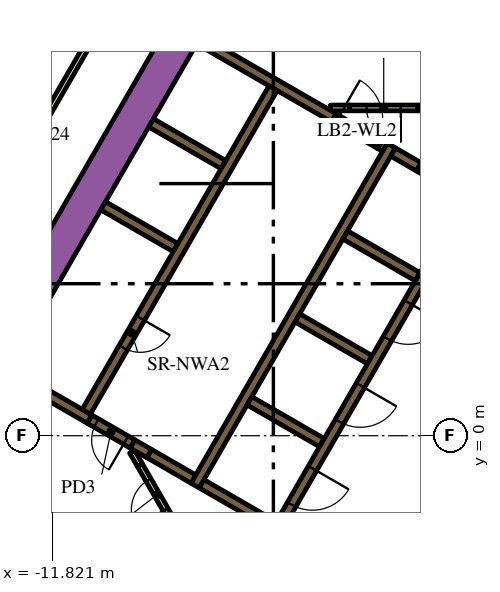
"""IFC4 building model, lengths in metres.
Left out: names, types, materials, properties, quantities, classifications, styles, units other than length and angle.
Written with IfcOpenShell. Run it as: python <this file> out.ifc"""

import sys

from ifc_helpers import new_model, si_unit, direction, frame, frame_2d, origin, place, context, subcontext, project, spatial, polyline, rectangle, outline, extrude, element, fill, save


model = new_model("IFC4")
c1 = context("Model", 3, precision=1e-05, world=origin(), true_north=direction((0.0, 1.0)))
c2 = subcontext(c1, "Body", "Model", "MODEL_VIEW")
j1 = project(units=[si_unit("LENGTHUNIT", "METRE"), si_unit("PLANEANGLEUNIT", "RADIAN")], contexts=[c1])
p1 = place(None, origin())
s1 = spatial("IfcSite", under=j1, at=p1, CompositionType="ELEMENT")
p2 = place(p1, origin())
s2 = spatial("IfcBuilding", under=s1, at=p2, CompositionType="ELEMENT")
p3 = place(p2, frame((0.0, 0.0, 130.5)))
s3 = spatial("IfcBuildingStorey", under=s2, at=p3, CompositionType="ELEMENT", Elevation=130.5)
p4 = place(p3, frame((-14.268, 0.387, 0.0), z_axis=(0.0, 0.0, 1.0), x_axis=(0.499994617707, 0.866028511231, 0.0)))
e1 = element("IfcWall", 1, at=p4, inside=s3, PredefinedType="SOLIDWALL", context=c2, shape_type="SweptSolid", body=[
    extrude(rectangle(XDim=18.817, YDim=0.9, at=frame_2d((9.409, 0.0))), origin(), (0.0, 0.0, 1.0), 3.9),
])
p5 = place(p3, frame((-8.06, -1.311, 0.0), z_axis=(0.0, 0.0, 1.0), x_axis=(0.50000273126, 0.866023826885, 0.0)))
e2 = element("IfcWall", 2, at=p5, inside=s3, PredefinedType="SOLIDWALL", context=c2, shape_type="SweptSolid", body=[
    extrude(rectangle(XDim=10.33, YDim=0.25, at=frame_2d((5.165, 0.0))), origin(), (0.0, 0.0, 1.0), 3.9),
])
p6 = place(p3, frame((-1.819, 6.87, 0.0), z_axis=(0.0, 0.0, 1.0), x_axis=(-0.866294599386, 0.499533449405, 0.0)))
e3 = element("IfcWall", 3, at=p6, inside=s3, PredefinedType="SOLIDWALL", context=c2, shape_type="SweptSolid", body=[
    extrude(rectangle(XDim=0.41, YDim=0.25, at=frame_2d((0.205, 0.0))), origin(), (0.0, 0.0, 1.0), 3.9),
])
p7 = place(p3, frame((-2.849, 7.465, 0.0), z_axis=(0.0, 0.0, 1.0), x_axis=(0.865955664968, -0.500120771724, 0.0)))
e4 = element("IfcWall", 4, at=p7, inside=s3, PredefinedType="SOLIDWALL", context=c2, shape_type="SweptSolid", body=[
    extrude(rectangle(XDim=0.778, YDim=0.25, at=frame_2d((0.389, 0.0))), origin(), (0.0, 0.0, 1.0), 3.9),
])
for number, where, z_axis, x_axis in (
    (5, (-2.204, 4.182, 0.0), (0.0, 0.0, 1.0), (-0.866, 0.5, 0.0)),
    (6, (-5.369, 3.1, 0.0), (0.0, 0.0, 1.0), (0.866, -0.5, 0.0)),
    (7, (-4.724, -0.182, 0.0), (0.0, 0.0, 1.0), (-0.866, 0.5, 0.0)),
):
    element("IfcWall", number, at=place(p3, frame(where, z_axis=z_axis, x_axis=x_axis)), inside=s3, PredefinedType="SOLIDWALL", context=c2, shape_type="SweptSolid", body=[
        extrude(rectangle(XDim=2.2, YDim=0.25, at=frame_2d((1.1, 0.0))), origin(), (0.0, 0.0, 1.0), 3.9),
    ])
p8 = place(p3, origin())
e8 = element("IfcWall", 8, at=p8, inside=s3, PredefinedType="SOLIDWALL", context=c2, shape_type="SweptSolid", body=[
    extrude(outline(polyline([(-5.922, -2.257), (-5.922, -2.257), (-5.705, -2.382), (-5.83, -2.598), (-6.418, -2.258), (-6.433, -2.153), (-6.433, -2.153), (-6.433, -2.153), (-6.508, -2.163), (-6.508, -2.163), (-6.508, -2.163), (-6.501, -2.21), (-7.952, -1.373), (-7.827, -1.156), (-5.922, -2.257)])), origin(), (0.0, 0.0, 1.0), 3.9),
])
p9 = place(p3, frame((-9.708, -0.215, 0.0), z_axis=(0.0, 0.0, 1.0), x_axis=(0.866113839764, -0.499846793097, 0.0)))
e9 = element("IfcWall", 9, at=p9, inside=s3, PredefinedType="SOLIDWALL", context=c2, shape_type="SweptSolid", body=[
    extrude(rectangle(XDim=0.51, YDim=0.25, at=frame_2d((0.255, 0.0))), origin(), (0.0, 0.0, 1.0), 3.9),
])
p10 = place(p3, frame((-12.999, 1.685, 0.0), z_axis=(0.0, 0.0, 1.0), x_axis=(0.865996765544, -0.500049599607, 0.0)))
e10 = element("IfcWall", 10, at=p10, inside=s3, PredefinedType="SOLIDWALL", context=c2, shape_type="SweptSolid", body=[
    extrude(rectangle(XDim=2.498, YDim=0.25, at=frame_2d((1.249, 0.0))), origin(), (0.0, 0.0, 1.0), 3.9),
])
p11 = place(p3, frame((-9.265, -0.471, 0.0), z_axis=(0.0, 0.0, 1.0), x_axis=(0.865954634268, -0.500122556369, 0.0)))
e11 = element("IfcWall", 11, at=p11, inside=s3, PredefinedType="SOLIDWALL", context=c2, shape_type="SweptSolid", body=[
    extrude(rectangle(XDim=1.338, YDim=0.25, at=frame_2d((0.669, 0.0))), origin(), (0.0, 0.0, 1.0), 3.9),
])
e12 = element("IfcWall", 12, at=p8, inside=s3, PredefinedType="SOLIDWALL", context=c2, shape_type="SweptSolid", body=[
    extrude(outline(polyline([(-3.128, 7.481), (-3.259, 7.557), (-3.134, 7.773), (-3.003, 7.698), (-3.128, 7.481)])), origin(), (0.0, 0.0, 1.0), 3.9),
])
for number, where, z_axis, x_axis in (
    (13, (-8.574, 4.95, 0.0), (0.0, 0.0, 1.0), (-0.866, 0.5, 0.0)),
    (14, (-7.314, 7.132, 0.0), (0.0, 0.0, 1.0), (-0.866, 0.5, 0.0)),
):
    element("IfcWall", number, at=place(p3, frame(where, z_axis=z_axis, x_axis=x_axis)), inside=s3, PredefinedType="SOLIDWALL", context=c2, shape_type="SweptSolid", body=[
        extrude(rectangle(XDim=2.2, YDim=0.25, at=frame_2d((1.1, 0.0))), origin(), (0.0, 0.0, 1.0), 3.9),
    ])
p12 = place(p3, frame((-7.959, 10.415, 0.0), z_axis=(0.0, 0.0, 1.0), x_axis=(0.866020958405, -0.500007699544, 0.0)))
e15 = element("IfcWall", 15, at=p12, inside=s3, PredefinedType="SOLIDWALL", context=c2, shape_type="SweptSolid", body=[
    extrude(rectangle(XDim=4.1, YDim=0.25, at=frame_2d((2.05, 0.0))), origin(), (0.0, 0.0, 1.0), 3.9),
])
p13 = place(p3, frame((-6.531, -2.689, 0.0), z_axis=(0.0, 0.0, 1.0), x_axis=(-0.499967446111, 0.866044197965, 0.0)))
e16 = element("IfcWall", 16, at=p13, inside=s3, PredefinedType="PARTITIONING", context=c2, shape_type="SweptSolid", body=[
    extrude(rectangle(XDim=0.748, YDim=0.15, at=frame_2d((0.374, 0.0))), origin(), (0.0, 0.0, 1.0), 2.6),
])
p14 = place(p3, frame((-9.512, -0.775, 0.0), z_axis=(0.0, 0.0, 1.0), x_axis=(-0.500080620599, 0.865978852456, 0.0)))
e17 = element("IfcWall", 17, at=p14, inside=s3, PredefinedType="PARTITIONING", context=c2, shape_type="SweptSolid", body=[
    extrude(rectangle(XDim=0.413, YDim=0.15, at=frame_2d((0.207, 0.0))), origin(), (0.0, 0.0, 1.0), 2.6),
])
p15 = place(p3, frame((-3.997, 8.625, 0.0), z_axis=(0.0, 0.0, 1.0), x_axis=(-1.0, 0.0, 0.0)))
e18 = element("IfcWall", 18, at=p15, inside=s3, PredefinedType="PARTITIONING", context=c2, shape_type="SweptSolid", body=[
    extrude(rectangle(XDim=0.502, YDim=0.15, at=frame_2d((0.251, 0.0))), origin(), (0.0, 0.0, 1.0), 2.6),
])
p16 = place(p3, frame((-2.196, 8.625, 0.0), z_axis=(0.0, 0.0, 1.0), x_axis=(1.0, 0.0, 0.0)))
e19 = element("IfcWall", 19, at=p16, inside=s3, PredefinedType="PARTITIONING", context=c2, shape_type="SweptSolid", body=[
    extrude(rectangle(XDim=1.146, YDim=0.15, at=frame_2d((0.573, 0.0))), origin(), (0.0, 0.0, 1.0), 2.6),
])
p17 = place(p3, frame((-6.008, 9.144, 0.0), z_axis=(0.0, 0.0, 1.0), x_axis=(-0.500006956611, -0.866021387346, 0.0)))
e20 = element("IfcWall", 20, at=p17, inside=s3, PredefinedType="SOLIDWALL", context=c2, shape_type="SweptSolid", body=[
    extrude(rectangle(XDim=9.83, YDim=0.25, at=frame_2d((4.915, 0.0))), origin(), (0.0, 0.0, 1.0), 3.9),
])
p18 = place(p17, frame((6.985, 0.0, 0.0)))
e21 = element("IfcOpeningElement", 21, at=p18, cuts=e20, PredefinedType="OPENING", context=c2, shape_type="SweptSolid", body=[
    extrude(rectangle(XDim=0.9, YDim=2.1, at=frame_2d((0.45, 1.05))), frame((0.0, 0.135, 0.0), z_axis=(0.0, -1.0, 0.0), x_axis=(1.0, 0.0, 0.0)), (0.0, 0.0, 1.0), 0.27),
])
p19 = place(p3, frame((-0.898, 6.194, 0.0), z_axis=(0.0, 0.0, 1.0), x_axis=(-0.499996202215, -0.866027596426, 0.0)))
e22 = element("IfcWall", 22, at=p19, inside=s3, PredefinedType="SOLIDWALL", context=c2, shape_type="SweptSolid", body=[
    extrude(rectangle(XDim=9.83, YDim=0.25, at=frame_2d((4.915, 0.0))), origin(), (0.0, 0.0, 1.0), 3.9),
])
p20 = place(p19, frame((0.585, 0.0, 0.0)))
e23 = element("IfcOpeningElement", 23, at=p20, cuts=e22, PredefinedType="OPENING", context=c2, shape_type="SweptSolid", body=[
    extrude(rectangle(XDim=1.1, YDim=2.1, at=frame_2d((0.55, 1.05))), frame((0.0, 0.135, 0.0), z_axis=(0.0, -1.0, 0.0), x_axis=(1.0, 0.0, 0.0)), (0.0, 0.0, 1.0), 0.27),
])
p21 = place(p19, frame((3.105, 0.0, 0.0)))
e24 = element("IfcOpeningElement", 24, at=p21, cuts=e22, PredefinedType="OPENING", context=c2, shape_type="SweptSolid", body=[
    extrude(rectangle(XDim=1.1, YDim=2.1, at=frame_2d((0.55, 1.05))), frame((0.0, 0.135, 0.0), z_axis=(0.0, -1.0, 0.0), x_axis=(1.0, 0.0, 0.0)), (0.0, 0.0, 1.0), 0.27),
])
p22 = place(p19, frame((5.625, 0.0, 0.0)))
e25 = element("IfcOpeningElement", 25, at=p22, cuts=e22, PredefinedType="OPENING", context=c2, shape_type="SweptSolid", body=[
    extrude(rectangle(XDim=1.1, YDim=2.1, at=frame_2d((0.55, 1.05))), frame((0.0, 0.135, 0.0), z_axis=(0.0, -1.0, 0.0), x_axis=(1.0, 0.0, 0.0)), (0.0, 0.0, 1.0), 0.27),
])
p23 = place(p19, frame((8.145, 0.0, 0.0)))
e26 = element("IfcOpeningElement", 26, at=p23, cuts=e22, PredefinedType="OPENING", context=c2, shape_type="SweptSolid", body=[
    extrude(rectangle(XDim=1.1, YDim=2.1, at=frame_2d((0.55, 1.05))), frame((0.0, 0.135, 0.0), z_axis=(0.0, -1.0, 0.0), x_axis=(1.0, 0.0, 0.0)), (0.0, 0.0, 1.0), 0.27),
])
p24 = place(p3, frame((-2.196, 8.625, 0.0), z_axis=(0.0, 0.0, 1.0), x_axis=(-1.0, 0.0, 0.0)))
e27 = element("IfcWall", 27, at=p24, inside=s3, PredefinedType="PARTITIONING", context=c2, shape_type="SweptSolid", body=[
    extrude(rectangle(XDim=1.8, YDim=0.15, at=frame_2d((0.9, 0.0))), origin(), (0.0, 0.0, 1.0), 2.6),
])
p25 = place(p24, frame((0.45, 0.0, 0.0)))
e28 = element("IfcOpeningElement", 28, at=p25, cuts=e27, PredefinedType="OPENING", context=c2, shape_type="SweptSolid", body=[
    extrude(rectangle(XDim=0.9, YDim=2.1, at=frame_2d((0.45, 1.05))), frame((0.0, 0.085, 0.0), z_axis=(0.0, -1.0, 0.0), x_axis=(1.0, 0.0, 0.0)), (0.0, 0.0, 1.0), 0.17),
])
p26 = place(p3, frame((-9.708, -0.215, 0.0), z_axis=(0.0, 0.0, 1.0), x_axis=(-0.866004217611, 0.500036693733, 0.0)))
e29 = element("IfcWall", 29, at=p26, inside=s3, PredefinedType="SOLIDWALL", context=c2, shape_type="SweptSolid", body=[
    extrude(rectangle(XDim=1.3, YDim=0.25, at=frame_2d((0.65, 0.0))), origin(), (0.0, 0.0, 1.0), 3.9),
])
p27 = place(p26, frame((0.2, 0.0, 0.0)))
e30 = element("IfcOpeningElement", 30, at=p27, cuts=e29, PredefinedType="OPENING", context=c2, shape_type="SweptSolid", body=[
    extrude(rectangle(XDim=0.9, YDim=2.1, at=frame_2d((0.45, 1.05))), frame((0.0, 0.135, 0.0), z_axis=(0.0, -1.0, 0.0), x_axis=(1.0, 0.0, 0.0)), (0.0, 0.0, 1.0), 0.27),
])
p28 = place(p3, frame((-4.409, 8.365, 0.0), z_axis=(0.0, 0.0, 1.0), x_axis=(0.866034573852, -0.49998411664, 0.0)))
e31 = element("IfcWall", 31, at=p28, inside=s3, PredefinedType="SOLIDWALL", context=c2, shape_type="SweptSolid", body=[
    extrude(rectangle(XDim=1.4, YDim=0.25, at=frame_2d((0.7, 0.0))), origin(), (0.0, 0.0, 1.0), 3.9),
])
p29 = place(p28, frame((0.1, 0.0, 0.0)))
e32 = element("IfcOpeningElement", 32, at=p29, cuts=e31, PredefinedType="OPENING", context=c2, shape_type="SweptSolid", body=[
    extrude(rectangle(XDim=1.2, YDim=2.1, at=frame_2d((0.6, 1.05))), frame((0.0, 0.135, 0.0), z_axis=(0.0, -1.0, 0.0), x_axis=(1.0, 0.0, 0.0)), (0.0, 0.0, 1.0), 0.27),
])
p30 = place(p3, frame((-8.612, -2.333, 0.0), z_axis=(0.0, 0.0, 1.0), x_axis=(-0.499961193289, 0.866047807691, 0.0)))
e33 = element("IfcWall", 33, at=p30, inside=s3, PredefinedType="PARTITIONING", context=c2, shape_type="SweptSolid", body=[
    extrude(rectangle(XDim=1.8, YDim=0.15, at=frame_2d((0.9, 0.0))), origin(), (0.0, 0.0, 1.0), 2.6),
])
p31 = place(p30, frame((0.45, 0.0, 0.0)))
e34 = element("IfcOpeningElement", 34, at=p31, cuts=e33, PredefinedType="OPENING", context=c2, shape_type="SweptSolid", body=[
    extrude(rectangle(XDim=0.9, YDim=2.1, at=frame_2d((0.45, 1.05))), frame((0.0, 0.085, 0.0), z_axis=(0.0, -1.0, 0.0), x_axis=(1.0, 0.0, 0.0)), (0.0, 0.0, 1.0), 0.17),
])
p32 = place(p3, frame((-19.081, -3.9, 0.0), z_axis=(0.0, 0.0, 1.0), x_axis=(0.499998313975, 0.866026377209, 0.0)))
e35 = element("IfcWall", 35, at=p32, inside=s3, PredefinedType="PARTITIONING", context=c2, shape_type="SweptSolid", body=[
    extrude(rectangle(XDim=25.766, YDim=0.15, at=frame_2d((12.883, 0.0))), origin(), (0.0, 0.0, 1.0), 2.6),
])
p33 = place(p32, frame((24.141, 0.0, 0.0)))
e36 = element("IfcOpeningElement", 36, at=p33, cuts=e35, PredefinedType="OPENING", context=c2, shape_type="SweptSolid", body=[
    extrude(rectangle(XDim=1.1, YDim=2.1, at=frame_2d((0.55, 1.05))), frame((0.0, 0.085, 0.0), z_axis=(0.0, -1.0, 0.0), x_axis=(1.0, 0.0, 0.0)), (0.0, 0.0, 1.0), 0.17),
])
p34 = place(p32, frame((13.144, 0.0, 0.0)))
e37 = element("IfcOpeningElement", 37, at=p34, cuts=e35, PredefinedType="OPENING", context=c2, shape_type="SweptSolid", body=[
    extrude(rectangle(XDim=1.0, YDim=2.1, at=frame_2d((0.5, 1.05))), frame((0.0, 0.085, 0.0), z_axis=(0.0, -1.0, 0.0), x_axis=(1.0, 0.0, 0.0)), (0.0, 0.0, 1.0), 0.17),
])
p35 = place(p32, frame((11.593, 0.0, 0.0)))
e38 = element("IfcOpeningElement", 38, at=p35, cuts=e35, PredefinedType="OPENING", context=c2, shape_type="SweptSolid", body=[
    extrude(rectangle(XDim=1.1, YDim=2.1, at=frame_2d((0.55, 1.05))), frame((0.0, 0.085, 0.0), z_axis=(0.0, -1.0, 0.0), x_axis=(1.0, 0.0, 0.0)), (0.0, 0.0, 1.0), 0.17),
])
p36 = place(p32, frame((0.596, 0.0, 0.0)))
e39 = element("IfcOpeningElement", 39, at=p36, cuts=e35, PredefinedType="OPENING", context=c2, shape_type="SweptSolid", body=[
    extrude(rectangle(XDim=1.0, YDim=2.1, at=frame_2d((0.5, 1.05))), frame((0.0, 0.085, 0.0), z_axis=(0.0, -1.0, 0.0), x_axis=(1.0, 0.0, 0.0)), (0.0, 0.0, 1.0), 0.17),
])
p37 = place(p18, origin())
e40 = element("IfcDoor", 40, at=p37, inside=s3, OperationType="SINGLE_SWING_LEFT", PredefinedType="DOOR", context=c2, shape_type="SweptSolid", body=[
    extrude(rectangle(XDim=0.9, YDim=2.1, at=frame_2d((0.45, 1.05))), frame((0.0, 0.025, 0.0), z_axis=(0.0, -1.0, 0.0), x_axis=(1.0, 0.0, 0.0)), (0.0, 0.0, 1.0), 0.05),
])
fill(e21, e40)
p38 = place(p21, origin())
e41 = element("IfcDoor", 41, at=p38, inside=s3, OperationType="DOUBLE_DOOR_SLIDING", PredefinedType="DOOR", context=c2, shape_type="SweptSolid", body=[
    extrude(rectangle(XDim=1.1, YDim=2.1, at=frame_2d((0.55, 1.05))), frame((0.0, 0.025, 0.0), z_axis=(0.0, -1.0, 0.0), x_axis=(1.0, 0.0, 0.0)), (0.0, 0.0, 1.0), 0.05),
])
fill(e24, e41)
p39 = place(p22, origin())
e42 = element("IfcDoor", 42, at=p39, inside=s3, OperationType="DOUBLE_DOOR_SLIDING", PredefinedType="DOOR", context=c2, shape_type="SweptSolid", body=[
    extrude(rectangle(XDim=1.1, YDim=2.1, at=frame_2d((0.55, 1.05))), frame((0.0, 0.025, 0.0), z_axis=(0.0, -1.0, 0.0), x_axis=(1.0, 0.0, 0.0)), (0.0, 0.0, 1.0), 0.05),
])
fill(e25, e42)
p40 = place(p23, origin())
e43 = element("IfcDoor", 43, at=p40, inside=s3, OperationType="DOUBLE_DOOR_SLIDING", PredefinedType="DOOR", context=c2, shape_type="SweptSolid", body=[
    extrude(rectangle(XDim=1.1, YDim=2.1, at=frame_2d((0.55, 1.05))), frame((0.0, 0.025, 0.0), z_axis=(0.0, -1.0, 0.0), x_axis=(1.0, 0.0, 0.0)), (0.0, 0.0, 1.0), 0.05),
])
fill(e26, e43)
p41 = place(p25, origin())
e44 = element("IfcDoor", 44, at=p41, inside=s3, OperationType="SINGLE_SWING_LEFT", PredefinedType="DOOR", context=c2, shape_type="SweptSolid", body=[
    extrude(rectangle(XDim=0.9, YDim=2.1, at=frame_2d((0.45, 1.05))), frame((0.0, 0.025, 0.0), z_axis=(0.0, -1.0, 0.0), x_axis=(1.0, 0.0, 0.0)), (0.0, 0.0, 1.0), 0.05),
])
fill(e28, e44)
p42 = place(p27, origin())
e45 = element("IfcDoor", 45, at=p42, inside=s3, OperationType="SINGLE_SWING_LEFT", PredefinedType="DOOR", context=c2, shape_type="SweptSolid", body=[
    extrude(rectangle(XDim=0.9, YDim=2.1, at=frame_2d((0.45, 1.05))), frame((0.0, 0.025, 0.0), z_axis=(0.0, -1.0, 0.0), x_axis=(1.0, 0.0, 0.0)), (0.0, 0.0, 1.0), 0.05),
])
fill(e30, e45)
p43 = place(p29, origin())
e46 = element("IfcDoor", 46, at=p43, inside=s3, OperationType="SINGLE_SWING_LEFT", PredefinedType="DOOR", context=c2, shape_type="SweptSolid", body=[
    extrude(rectangle(XDim=1.2, YDim=2.1, at=frame_2d((0.6, 1.05))), frame((0.0, 0.025, 0.0), z_axis=(0.0, -1.0, 0.0), x_axis=(1.0, 0.0, 0.0)), (0.0, 0.0, 1.0), 0.05),
])
fill(e32, e46)
p44 = place(p31, origin())
e47 = element("IfcDoor", 47, at=p44, inside=s3, OperationType="SINGLE_SWING_LEFT", PredefinedType="DOOR", context=c2, shape_type="SweptSolid", body=[
    extrude(rectangle(XDim=0.9, YDim=2.1, at=frame_2d((0.45, 1.05))), frame((0.0, 0.025, 0.0), z_axis=(0.0, -1.0, 0.0), x_axis=(1.0, 0.0, 0.0)), (0.0, 0.0, 1.0), 0.05),
])
fill(e34, e47)
save(model, sys.argv[1])
